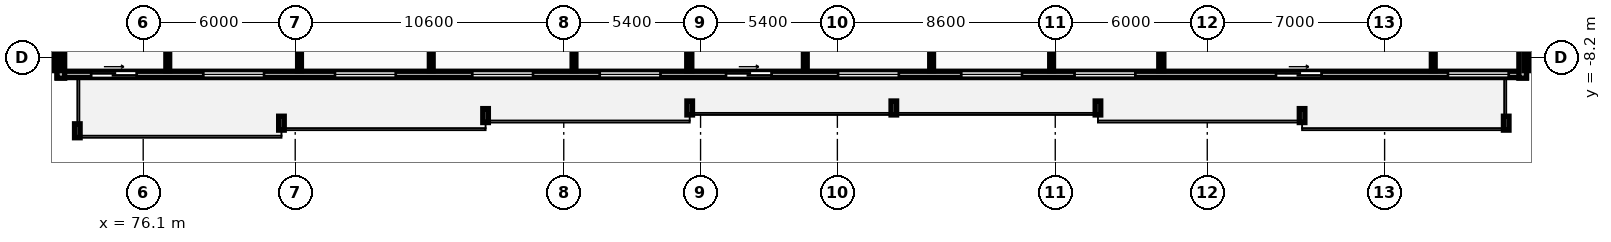
"""IFC4 building model, lengths in metres.
Left out: names, types, materials, properties, quantities, classifications, styles, units other than length and angle.
Written with IfcOpenShell. Run it as: python <this file> out.ifc"""

import sys

from ifc_helpers import new_model, si_unit, direction, frame, frame_2d, origin, place, context, subcontext, project, spatial, rectangle, extrude, element, fill, save


model = new_model("IFC4")
c1 = context("Model", 3, precision=1e-05, world=origin(), true_north=direction((0.0, 1.0)))
c2 = subcontext(c1, "Body", "Model", "MODEL_VIEW")
j1 = project(units=[si_unit("LENGTHUNIT", "METRE"), si_unit("PLANEANGLEUNIT", "RADIAN")], contexts=[c1])
p1 = place(None, origin())
s1 = spatial("IfcSite", under=j1, at=p1, CompositionType="ELEMENT")
p2 = place(p1, origin())
s2 = spatial("IfcBuilding", under=s1, at=p2, CompositionType="ELEMENT")
p3 = place(p2, frame((0.0, 0.0, 126.3)))
s3 = spatial("IfcBuildingStorey", under=s2, at=p3, CompositionType="ELEMENT", Elevation=126.3)
p4 = place(p3, frame((72.7, -8.85, 0.0), z_axis=(0.0, 0.0, 1.0), x_axis=(1.0, 0.0, 0.0)))
e1 = element("IfcWall", 1, at=p4, inside=s3, PredefinedType="STANDARD", context=c2, shape_type="SweptSolid", body=[
    extrude(rectangle(XDim=58.0, YDim=0.25, at=frame_2d((29.0, 0.0))), origin(), (0.0, 0.0, 1.0), 2.97),
])
p5 = place(p4, frame((5.77, 0.0, 0.85)))
e2 = element("IfcOpeningElement", 2, at=p5, cuts=e1, PredefinedType="OPENING", context=c2, shape_type="SweptSolid", body=[
    extrude(rectangle(XDim=2.4, YDim=1.9, at=frame_2d((1.2, 0.95))), frame((0.0, 0.135, 0.0), z_axis=(0.0, -1.0, 0.0), x_axis=(1.0, 0.0, 0.0)), (0.0, 0.0, 1.0), 0.27),
])
p6 = place(p4, frame((10.97, 0.0, 0.85)))
e3 = element("IfcOpeningElement", 3, at=p6, cuts=e1, PredefinedType="OPENING", context=c2, shape_type="SweptSolid", body=[
    extrude(rectangle(XDim=2.4, YDim=1.9, at=frame_2d((1.2, 0.95))), frame((0.0, 0.135, 0.0), z_axis=(0.0, -1.0, 0.0), x_axis=(1.0, 0.0, 0.0)), (0.0, 0.0, 1.0), 0.27),
])
p7 = place(p4, frame((16.387, 0.0, 0.85)))
e4 = element("IfcOpeningElement", 4, at=p7, cuts=e1, PredefinedType="OPENING", context=c2, shape_type="SweptSolid", body=[
    extrude(rectangle(XDim=2.4, YDim=1.9, at=frame_2d((1.2, 0.95))), frame((0.0, 0.135, 0.0), z_axis=(0.0, -1.0, 0.0), x_axis=(1.0, 0.0, 0.0)), (0.0, 0.0, 1.0), 0.27),
])
p8 = place(p4, frame((1.345, 0.0, 0.0)))
e5 = element("IfcOpeningElement", 5, at=p8, cuts=e1, PredefinedType="OPENING", context=c2, shape_type="SweptSolid", body=[
    extrude(rectangle(XDim=1.8, YDim=2.2, at=frame_2d((0.9, 1.1))), frame((0.0, 0.135, 0.0), z_axis=(0.0, -1.0, 0.0), x_axis=(1.0, 0.0, 0.0)), (0.0, 0.0, 1.0), 0.27),
])
p9 = place(p4, frame((21.419, 0.0, 0.85)))
e6 = element("IfcOpeningElement", 6, at=p9, cuts=e1, PredefinedType="OPENING", context=c2, shape_type="SweptSolid", body=[
    extrude(rectangle(XDim=2.4, YDim=1.9, at=frame_2d((1.2, 0.95))), frame((0.0, 0.135, 0.0), z_axis=(0.0, -1.0, 0.0), x_axis=(1.0, 0.0, 0.0)), (0.0, 0.0, 1.0), 0.27),
])
p10 = place(p4, frame((30.827, 0.0, 0.85)))
e7 = element("IfcOpeningElement", 7, at=p10, cuts=e1, PredefinedType="OPENING", context=c2, shape_type="SweptSolid", body=[
    extrude(rectangle(XDim=2.4, YDim=1.9, at=frame_2d((1.2, 0.95))), frame((0.0, 0.135, 0.0), z_axis=(0.0, -1.0, 0.0), x_axis=(1.0, 0.0, 0.0)), (0.0, 0.0, 1.0), 0.27),
])
p11 = place(p4, frame((35.688, 0.0, 0.85)))
e8 = element("IfcOpeningElement", 8, at=p11, cuts=e1, PredefinedType="OPENING", context=c2, shape_type="SweptSolid", body=[
    extrude(rectangle(XDim=2.4, YDim=1.9, at=frame_2d((1.2, 0.95))), frame((0.0, 0.135, 0.0), z_axis=(0.0, -1.0, 0.0), x_axis=(1.0, 0.0, 0.0)), (0.0, 0.0, 1.0), 0.27),
])
p12 = place(p4, frame((26.405, 0.0, 0.0)))
e9 = element("IfcOpeningElement", 9, at=p12, cuts=e1, PredefinedType="OPENING", context=c2, shape_type="SweptSolid", body=[
    extrude(rectangle(XDim=1.8, YDim=2.2, at=frame_2d((0.9, 1.1))), frame((0.0, 0.135, 0.0), z_axis=(0.0, -1.0, 0.0), x_axis=(1.0, 0.0, 0.0)), (0.0, 0.0, 1.0), 0.27),
])
p13 = place(p4, frame((40.161, 0.0, 0.85)))
e10 = element("IfcOpeningElement", 10, at=p13, cuts=e1, PredefinedType="OPENING", context=c2, shape_type="SweptSolid", body=[
    extrude(rectangle(XDim=2.4, YDim=1.9, at=frame_2d((1.2, 0.95))), frame((0.0, 0.135, 0.0), z_axis=(0.0, -1.0, 0.0), x_axis=(1.0, 0.0, 0.0)), (0.0, 0.0, 1.0), 0.27),
])
p14 = place(p4, frame((48.113, 0.0, 0.0)))
e11 = element("IfcOpeningElement", 11, at=p14, cuts=e1, PredefinedType="OPENING", context=c2, shape_type="SweptSolid", body=[
    extrude(rectangle(XDim=1.8, YDim=2.2, at=frame_2d((0.9, 1.1))), frame((0.0, 0.135, 0.0), z_axis=(0.0, -1.0, 0.0), x_axis=(1.0, 0.0, 0.0)), (0.0, 0.0, 1.0), 0.27),
])
p15 = place(p4, frame((54.9, 0.0, 0.85)))
e12 = element("IfcOpeningElement", 12, at=p15, cuts=e1, PredefinedType="OPENING", context=c2, shape_type="SweptSolid", body=[
    extrude(rectangle(XDim=2.4, YDim=1.9, at=frame_2d((1.2, 0.95))), frame((0.0, 0.135, 0.0), z_axis=(0.0, -1.0, 0.0), x_axis=(1.0, 0.0, 0.0)), (0.0, 0.0, 1.0), 0.27),
])
for number, where, z_axis, x_axis in (
    (13, (130.55, -9.0, 0.0), (0.0, 0.0, 1.0), (0.0, 1.0, 0.0)),
    (14, (72.85, -5.4, 0.0), (0.0, 0.0, 1.0), (0.0, -1.0, 0.0)),
):
    element("IfcWall", number, at=place(p3, frame(where, z_axis=z_axis, x_axis=x_axis)), inside=s3, PredefinedType="STANDARD", context=c2, shape_type="SweptSolid", body=[
        extrude(rectangle(XDim=3.6, YDim=0.3, at=frame_2d((1.8, 0.0))), origin(), (0.0, 0.0, 1.0), 2.97),
    ])
for number, where, z_axis, x_axis in (
    (15, (72.7, -8.7, 0.0), (0.0, 0.0, 1.0), (0.0, 1.0, 0.0)),
    (16, (130.7, -8.7, 0.0), (0.0, 0.0, 1.0), (0.0, 1.0, 0.0)),
    (17, (97.655, -8.7, 0.0), (0.0, 0.0, 1.0), (0.0, 1.0, 0.0)),
):
    element("IfcWall", number, at=place(p3, frame(where, z_axis=z_axis, x_axis=x_axis)), inside=s3, PredefinedType="PARTITIONING", context=c2, shape_type="SweptSolid", body=[
        extrude(rectangle(XDim=24.57, YDim=0.2, at=frame_2d((12.285, 0.0))), origin(), (0.0, 0.0, 1.0), 2.97),
    ])
for number, where, z_axis, x_axis in (
    (18, (82.27, -8.7, 0.0), (0.0, 0.0, 1.0), (0.0, 1.0, 0.0)),
    (19, (87.47, -8.7, 0.0), (0.0, 0.0, 1.0), (0.0, 1.0, 0.0)),
):
    element("IfcWall", number, at=place(p3, frame(where, z_axis=z_axis, x_axis=x_axis)), inside=s3, PredefinedType="PARTITIONING", context=c2, shape_type="SweptSolid", body=[
        extrude(rectangle(XDim=4.47, YDim=0.15, at=frame_2d((2.235, 0.0))), origin(), (0.0, 0.0, 1.0), 2.97),
    ])
p16 = place(p3, frame((77.07, -8.7, 0.0), z_axis=(0.0, 0.0, 1.0), x_axis=(0.0, 1.0, 0.0)))
e20 = element("IfcWall", 20, at=p16, inside=s3, PredefinedType="PARTITIONING", context=c2, shape_type="SweptSolid", body=[
    extrude(rectangle(XDim=9.61, YDim=0.15, at=frame_2d((4.805, 0.0))), origin(), (0.0, 0.0, 1.0), 2.97),
])
p17 = place(p16, frame((5.81, 0.0, 0.0)))
e21 = element("IfcOpeningElement", 21, at=p17, cuts=e20, PredefinedType="OPENING", context=c2, shape_type="SweptSolid", body=[
    extrude(rectangle(XDim=0.92, YDim=2.08, at=frame_2d((0.46, 1.04))), frame((0.0, 0.085, 0.0), z_axis=(0.0, -1.0, 0.0), x_axis=(1.0, 0.0, 0.0)), (0.0, 0.0, 1.0), 0.17),
])
p18 = place(p3, frame((93.104, -8.7, 0.0), z_axis=(0.0, 0.0, 1.0), x_axis=(0.0, 1.0, 0.0)))
e22 = element("IfcWall", 22, at=p18, inside=s3, PredefinedType="PARTITIONING", context=c2, shape_type="SweptSolid", body=[
    extrude(rectangle(XDim=6.99, YDim=0.15, at=frame_2d((3.495, 0.0))), origin(), (0.0, 0.0, 1.0), 2.97),
])
p19 = place(p18, frame((5.81, 0.0, 0.0)))
e23 = element("IfcOpeningElement", 23, at=p19, cuts=e22, PredefinedType="OPENING", context=c2, shape_type="SweptSolid", body=[
    extrude(rectangle(XDim=0.92, YDim=2.08, at=frame_2d((0.46, 1.04))), frame((0.0, 0.085, 0.0), z_axis=(0.0, -1.0, 0.0), x_axis=(1.0, 0.0, 0.0)), (0.0, 0.0, 1.0), 0.17),
])
p20 = place(p3, frame((116.286, -8.7, 0.0), z_axis=(0.0, 0.0, 1.0), x_axis=(0.0, 1.0, 0.0)))
e24 = element("IfcWall", 24, at=p20, inside=s3, PredefinedType="PARTITIONING", context=c2, shape_type="SweptSolid", body=[
    extrude(rectangle(XDim=24.57, YDim=0.2, at=frame_2d((12.285, 0.0))), origin(), (0.0, 0.0, 1.0), 2.97),
])
p21 = place(p3, frame((107.22, -8.7, 0.0), z_axis=(0.0, 0.0, 1.0), x_axis=(0.0, 1.0, 0.0)))
e25 = element("IfcWall", 25, at=p21, inside=s3, PredefinedType="PARTITIONING", context=c2, shape_type="SweptSolid", body=[
    extrude(rectangle(XDim=4.47, YDim=0.15, at=frame_2d((2.235, 0.0))), origin(), (0.0, 0.0, 1.0), 2.97),
])
p22 = place(p3, frame((102.235, -8.7, 0.0), z_axis=(0.0, 0.0, 1.0), x_axis=(0.0, 1.0, 0.0)))
e26 = element("IfcWall", 26, at=p22, inside=s3, PredefinedType="PARTITIONING", context=c2, shape_type="SweptSolid", body=[
    extrude(rectangle(XDim=9.61, YDim=0.15, at=frame_2d((4.805, 0.0))), origin(), (0.0, 0.0, 1.0), 2.97),
])
p23 = place(p22, frame((5.92, 0.0, 0.0)))
e27 = element("IfcOpeningElement", 27, at=p23, cuts=e26, PredefinedType="OPENING", context=c2, shape_type="SweptSolid", body=[
    extrude(rectangle(XDim=0.92, YDim=2.08, at=frame_2d((0.46, 1.04))), frame((0.0, 0.085, 0.0), z_axis=(0.0, -1.0, 0.0), x_axis=(1.0, 0.0, 0.0)), (0.0, 0.0, 1.0), 0.17),
])
p24 = place(p3, frame((111.956, -8.7, 0.0), z_axis=(0.0, 0.0, 1.0), x_axis=(0.0, 1.0, 0.0)))
e28 = element("IfcWall", 28, at=p24, inside=s3, PredefinedType="PARTITIONING", context=c2, shape_type="SweptSolid", body=[
    extrude(rectangle(XDim=7.1, YDim=0.15, at=frame_2d((3.55, 0.0))), origin(), (0.0, 0.0, 1.0), 2.97),
])
p25 = place(p24, frame((4.87, 0.0, 0.0)))
e29 = element("IfcOpeningElement", 29, at=p25, cuts=e28, PredefinedType="OPENING", context=c2, shape_type="SweptSolid", body=[
    extrude(rectangle(XDim=0.92, YDim=2.08, at=frame_2d((0.46, 1.04))), frame((0.0, 0.085, 0.0), z_axis=(0.0, -1.0, 0.0), x_axis=(1.0, 0.0, 0.0)), (0.0, 0.0, 1.0), 0.17),
])
p26 = place(p3, frame((127.02, -8.7, 0.0), z_axis=(0.0, 0.0, 1.0), x_axis=(0.0, 1.0, 0.0)))
e30 = element("IfcWall", 30, at=p26, inside=s3, PredefinedType="PARTITIONING", context=c2, shape_type="SweptSolid", body=[
    extrude(rectangle(XDim=9.61, YDim=0.15, at=frame_2d((4.805, 0.0))), origin(), (0.0, 0.0, 1.0), 2.97),
])
p27 = place(p26, frame((6.065, 0.0, 0.0)))
e31 = element("IfcOpeningElement", 31, at=p27, cuts=e30, PredefinedType="OPENING", context=c2, shape_type="SweptSolid", body=[
    extrude(rectangle(XDim=0.84, YDim=2.04, at=frame_2d((0.42, 1.02))), frame((0.0, 0.085, 0.0), z_axis=(0.0, -1.0, 0.0), x_axis=(1.0, 0.0, 0.0)), (0.0, 0.0, 1.0), 0.17),
])
p28 = place(p26, frame((7.34, 0.0, 0.0)))
e32 = element("IfcOpeningElement", 32, at=p28, cuts=e30, PredefinedType="OPENING", context=c2, shape_type="SweptSolid", body=[
    extrude(rectangle(XDim=0.84, YDim=2.04, at=frame_2d((0.42, 1.02))), frame((0.0, 0.085, 0.0), z_axis=(0.0, -1.0, 0.0), x_axis=(1.0, 0.0, 0.0)), (0.0, 0.0, 1.0), 0.17),
])
p29 = place(p26, frame((1.971, 0.0, 0.0)))
e33 = element("IfcOpeningElement", 33, at=p29, cuts=e30, PredefinedType="OPENING", context=c2, shape_type="SweptSolid", body=[
    extrude(rectangle(XDim=0.88, YDim=2.06, at=frame_2d((0.44, 1.03))), frame((0.0, 0.085, 0.0), z_axis=(0.0, -1.0, 0.0), x_axis=(1.0, 0.0, 0.0)), (0.0, 0.0, 1.0), 0.17),
])
p30 = place(p5, origin())
e34 = element("IfcWindow", 34, at=p30, inside=s3, PartitioningType="DOUBLE_PANEL_VERTICAL", PredefinedType="WINDOW", context=c2, shape_type="SweptSolid", body=[
    extrude(rectangle(XDim=2.4, YDim=1.9, at=frame_2d((1.2, 0.95))), frame((0.0, 0.03, 0.0), z_axis=(0.0, -1.0, 0.0), x_axis=(1.0, 0.0, 0.0)), (0.0, 0.0, 1.0), 0.06),
])
fill(e2, e34)
p31 = place(p6, origin())
e35 = element("IfcWindow", 35, at=p31, inside=s3, PartitioningType="DOUBLE_PANEL_VERTICAL", PredefinedType="WINDOW", context=c2, shape_type="SweptSolid", body=[
    extrude(rectangle(XDim=2.4, YDim=1.9, at=frame_2d((1.2, 0.95))), frame((0.0, 0.03, 0.0), z_axis=(0.0, -1.0, 0.0), x_axis=(1.0, 0.0, 0.0)), (0.0, 0.0, 1.0), 0.06),
])
fill(e3, e35)
p32 = place(p7, origin())
e36 = element("IfcWindow", 36, at=p32, inside=s3, PartitioningType="DOUBLE_PANEL_VERTICAL", PredefinedType="WINDOW", context=c2, shape_type="SweptSolid", body=[
    extrude(rectangle(XDim=2.4, YDim=1.9, at=frame_2d((1.2, 0.95))), frame((0.0, 0.03, 0.0), z_axis=(0.0, -1.0, 0.0), x_axis=(1.0, 0.0, 0.0)), (0.0, 0.0, 1.0), 0.06),
])
fill(e4, e36)
p33 = place(p8, origin())
e37 = element("IfcDoor", 37, at=p33, inside=s3, OperationType="SLIDING_TO_RIGHT", PredefinedType="DOOR", context=c2, shape_type="SweptSolid", body=[
    extrude(rectangle(XDim=1.8, YDim=2.2, at=frame_2d((0.9, 1.1))), frame((0.0, 0.025, 0.0), z_axis=(0.0, -1.0, 0.0), x_axis=(1.0, 0.0, 0.0)), (0.0, 0.0, 1.0), 0.05),
])
fill(e5, e37)
p34 = place(p9, origin())
e38 = element("IfcWindow", 38, at=p34, inside=s3, PartitioningType="DOUBLE_PANEL_VERTICAL", PredefinedType="WINDOW", context=c2, shape_type="SweptSolid", body=[
    extrude(rectangle(XDim=2.4, YDim=1.9, at=frame_2d((1.2, 0.95))), frame((0.0, 0.03, 0.0), z_axis=(0.0, -1.0, 0.0), x_axis=(1.0, 0.0, 0.0)), (0.0, 0.0, 1.0), 0.06),
])
fill(e6, e38)
p35 = place(p10, origin())
e39 = element("IfcWindow", 39, at=p35, inside=s3, PartitioningType="DOUBLE_PANEL_VERTICAL", PredefinedType="WINDOW", context=c2, shape_type="SweptSolid", body=[
    extrude(rectangle(XDim=2.4, YDim=1.9, at=frame_2d((1.2, 0.95))), frame((0.0, 0.03, 0.0), z_axis=(0.0, -1.0, 0.0), x_axis=(1.0, 0.0, 0.0)), (0.0, 0.0, 1.0), 0.06),
])
fill(e7, e39)
p36 = place(p11, origin())
e40 = element("IfcWindow", 40, at=p36, inside=s3, PartitioningType="DOUBLE_PANEL_VERTICAL", PredefinedType="WINDOW", context=c2, shape_type="SweptSolid", body=[
    extrude(rectangle(XDim=2.4, YDim=1.9, at=frame_2d((1.2, 0.95))), frame((0.0, 0.03, 0.0), z_axis=(0.0, -1.0, 0.0), x_axis=(1.0, 0.0, 0.0)), (0.0, 0.0, 1.0), 0.06),
])
fill(e8, e40)
p37 = place(p12, origin())
e41 = element("IfcDoor", 41, at=p37, inside=s3, OperationType="SLIDING_TO_RIGHT", PredefinedType="DOOR", context=c2, shape_type="SweptSolid", body=[
    extrude(rectangle(XDim=1.8, YDim=2.2, at=frame_2d((0.9, 1.1))), frame((0.0, 0.025, 0.0), z_axis=(0.0, -1.0, 0.0), x_axis=(1.0, 0.0, 0.0)), (0.0, 0.0, 1.0), 0.05),
])
fill(e9, e41)
p38 = place(p13, origin())
e42 = element("IfcWindow", 42, at=p38, inside=s3, PartitioningType="DOUBLE_PANEL_VERTICAL", PredefinedType="WINDOW", context=c2, shape_type="SweptSolid", body=[
    extrude(rectangle(XDim=2.4, YDim=1.9, at=frame_2d((1.2, 0.95))), frame((0.0, 0.03, 0.0), z_axis=(0.0, -1.0, 0.0), x_axis=(1.0, 0.0, 0.0)), (0.0, 0.0, 1.0), 0.06),
])
fill(e10, e42)
p39 = place(p14, origin())
e43 = element("IfcDoor", 43, at=p39, inside=s3, OperationType="SLIDING_TO_RIGHT", PredefinedType="DOOR", context=c2, shape_type="SweptSolid", body=[
    extrude(rectangle(XDim=1.8, YDim=2.2, at=frame_2d((0.9, 1.1))), frame((0.0, 0.025, 0.0), z_axis=(0.0, -1.0, 0.0), x_axis=(1.0, 0.0, 0.0)), (0.0, 0.0, 1.0), 0.05),
])
fill(e11, e43)
p40 = place(p15, origin())
e44 = element("IfcWindow", 44, at=p40, inside=s3, PartitioningType="DOUBLE_PANEL_VERTICAL", PredefinedType="WINDOW", context=c2, shape_type="SweptSolid", body=[
    extrude(rectangle(XDim=2.4, YDim=1.9, at=frame_2d((1.2, 0.95))), frame((0.0, 0.03, 0.0), z_axis=(0.0, -1.0, 0.0), x_axis=(1.0, 0.0, 0.0)), (0.0, 0.0, 1.0), 0.06),
])
fill(e12, e44)
save(model, sys.argv[1])
